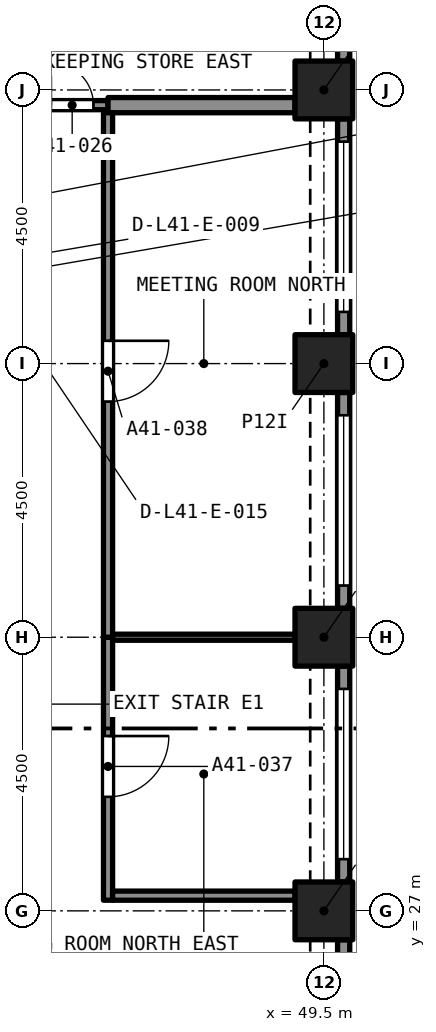
"""IFC4 building model, lengths in metres.
Left out: names, types, materials, properties, quantities, classifications, styles, units other than length and angle.
Written with IfcOpenShell. Run it as: python <this file> out.ifc"""

import sys

from ifc_helpers import new_model, si_unit, direction, frame, frame_2d, origin, origin_2d, place, context, subcontext, project, spatial, rectangle, extrude, element, fill, save


model = new_model("IFC4")
c1 = context("Model", 3, precision=1e-05, world=origin(), true_north=direction((0.0, 1.0)))
c2 = subcontext(c1, "Body", "Model", "MODEL_VIEW")
j1 = project(units=[si_unit("LENGTHUNIT", "METRE"), si_unit("PLANEANGLEUNIT", "RADIAN")], contexts=[c1])
p1 = place(None, origin())
s1 = spatial("IfcSite", under=j1, at=p1, CompositionType="ELEMENT")
p2 = place(p1, origin())
s2 = spatial("IfcBuilding", under=s1, at=p2, CompositionType="ELEMENT")
p3 = place(p2, frame((0.0, 0.0, 146.2)))
s3 = spatial("IfcBuildingStorey", under=s2, at=p3, CompositionType="ELEMENT", Elevation=146.2)
for number, where, z_axis, x_axis in (
    (1, (49.5, 27.0, 0.0), (0.0, 0.0, 1.0), (1.0, 0.0, 0.0)),
    (2, (49.5, 31.5, 0.0), (0.0, 0.0, 1.0), (1.0, 0.0, 0.0)),
    (3, (49.5, 36.0, 0.0), (0.0, 0.0, 1.0), (1.0, 0.0, 0.0)),
    (4, (49.5, 40.5, 0.0), (0.0, 0.0, 1.0), (1.0, 0.0, 0.0)),
):
    element("IfcColumn", number, at=place(p3, frame(where, z_axis=z_axis, x_axis=x_axis)), inside=s3, PredefinedType="COLUMN", context=c2, shape_type="SweptSolid", body=[
        extrude(rectangle(XDim=0.95, YDim=0.95, at=origin_2d()), origin(), (0.0, 0.0, 1.0), 4.4),
    ])
p4 = place(p3, frame((49.825, 26.525, 0.0), z_axis=(0.0, 0.0, 1.0), x_axis=(0.0, -1.0, 0.0)))
e5 = element("IfcWall", 5, at=p4, inside=s3, PredefinedType="SOLIDWALL", context=c2, shape_type="SweptSolid", body=[
    extrude(rectangle(XDim=3.55, YDim=0.2, at=frame_2d((1.775, 0.0))), origin(), (0.0, 0.0, 1.0), 4.4),
])
p5 = place(p4, frame((0.375, 0.0, 0.45)))
e6 = element("IfcOpeningElement", 6, at=p5, cuts=e5, PredefinedType="OPENING", context=c2, shape_type="SweptSolid", body=[
    extrude(rectangle(XDim=2.8, YDim=2.55, at=frame_2d((1.4, 1.275))), frame((0.0, 0.11, 0.0), z_axis=(0.0, -1.0, 0.0), x_axis=(1.0, 0.0, 0.0)), (0.0, 0.0, 1.0), 0.22),
])
p6 = place(p3, frame((49.825, 31.025, 0.0), z_axis=(0.0, 0.0, 1.0), x_axis=(0.0, -1.0, 0.0)))
e7 = element("IfcWall", 7, at=p6, inside=s3, PredefinedType="SOLIDWALL", context=c2, shape_type="SweptSolid", body=[
    extrude(rectangle(XDim=3.55, YDim=0.2, at=frame_2d((1.775, 0.0))), origin(), (0.0, 0.0, 1.0), 4.4),
])
p7 = place(p6, frame((0.375, 0.0, 0.45)))
e8 = element("IfcOpeningElement", 8, at=p7, cuts=e7, PredefinedType="OPENING", context=c2, shape_type="SweptSolid", body=[
    extrude(rectangle(XDim=2.8, YDim=2.55, at=frame_2d((1.4, 1.275))), frame((0.0, 0.11, 0.0), z_axis=(0.0, -1.0, 0.0), x_axis=(1.0, 0.0, 0.0)), (0.0, 0.0, 1.0), 0.22),
])
p8 = place(p3, frame((49.825, 35.525, 0.0), z_axis=(0.0, 0.0, 1.0), x_axis=(0.0, -1.0, 0.0)))
e9 = element("IfcWall", 9, at=p8, inside=s3, PredefinedType="SOLIDWALL", context=c2, shape_type="SweptSolid", body=[
    extrude(rectangle(XDim=3.55, YDim=0.2, at=frame_2d((1.775, 0.0))), origin(), (0.0, 0.0, 1.0), 4.4),
])
p9 = place(p8, frame((0.375, 0.0, 0.45)))
e10 = element("IfcOpeningElement", 10, at=p9, cuts=e9, PredefinedType="OPENING", context=c2, shape_type="SweptSolid", body=[
    extrude(rectangle(XDim=2.8, YDim=2.55, at=frame_2d((1.4, 1.275))), frame((0.0, 0.11, 0.0), z_axis=(0.0, -1.0, 0.0), x_axis=(1.0, 0.0, 0.0)), (0.0, 0.0, 1.0), 0.22),
])
p10 = place(p3, frame((49.825, 40.025, 0.0), z_axis=(0.0, 0.0, 1.0), x_axis=(0.0, -1.0, 0.0)))
e11 = element("IfcWall", 11, at=p10, inside=s3, PredefinedType="SOLIDWALL", context=c2, shape_type="SweptSolid", body=[
    extrude(rectangle(XDim=3.55, YDim=0.2, at=frame_2d((1.775, 0.0))), origin(), (0.0, 0.0, 1.0), 4.4),
])
p11 = place(p10, frame((0.375, 0.0, 0.45)))
e12 = element("IfcOpeningElement", 12, at=p11, cuts=e11, PredefinedType="OPENING", context=c2, shape_type="SweptSolid", body=[
    extrude(rectangle(XDim=2.8, YDim=2.55, at=frame_2d((1.4, 1.275))), frame((0.0, 0.11, 0.0), z_axis=(0.0, -1.0, 0.0), x_axis=(1.0, 0.0, 0.0)), (0.0, 0.0, 1.0), 0.22),
])
p12 = place(p3, frame((49.825, 44.525, 0.0), z_axis=(0.0, 0.0, 1.0), x_axis=(0.0, -1.0, 0.0)))
e13 = element("IfcWall", 13, at=p12, inside=s3, PredefinedType="SOLIDWALL", context=c2, shape_type="SweptSolid", body=[
    extrude(rectangle(XDim=3.55, YDim=0.2, at=frame_2d((1.775, 0.0))), origin(), (0.0, 0.0, 1.0), 4.4),
])
p13 = place(p12, frame((0.375, 0.0, 0.45)))
e14 = element("IfcOpeningElement", 14, at=p13, cuts=e13, PredefinedType="OPENING", context=c2, shape_type="SweptSolid", body=[
    extrude(rectangle(XDim=2.8, YDim=2.55, at=frame_2d((1.4, 1.275))), frame((0.0, 0.11, 0.0), z_axis=(0.0, -1.0, 0.0), x_axis=(1.0, 0.0, 0.0)), (0.0, 0.0, 1.0), 0.22),
])
p14 = place(p3, frame((44.75, 40.25, 0.0), z_axis=(0.0, 0.0, 1.0), x_axis=(1.0, 0.0, 0.0)))
e15 = element("IfcWall", 15, at=p14, inside=s3, PredefinedType="PARTITIONING", context=c2, shape_type="SweptSolid", body=[
    extrude(rectangle(XDim=1.2, YDim=0.15, at=frame_2d((0.6, 0.0))), origin(), (0.0, 0.0, 1.0), 4.1),
])
p15 = place(p14, frame((0.26, 0.0, 0.0)))
e16 = element("IfcOpeningElement", 16, at=p15, cuts=e15, PredefinedType="OPENING", context=c2, shape_type="SweptSolid", body=[
    extrude(rectangle(XDim=0.7, YDim=2.1, at=frame_2d((0.35, 1.05))), frame((0.0, 0.085, 0.0), z_axis=(0.0, -1.0, 0.0), x_axis=(1.0, 0.0, 0.0)), (0.0, 0.0, 1.0), 0.17),
])
p16 = place(p3, frame((45.95, 40.25, 0.0), z_axis=(0.0, 0.0, 1.0), x_axis=(1.0, 0.0, 0.0)))
e17 = element("IfcWall", 17, at=p16, inside=s3, PredefinedType="PARTITIONING", context=c2, shape_type="SweptSolid", body=[
    extrude(rectangle(XDim=3.075, YDim=0.25, at=frame_2d((1.538, 0.0))), origin(), (0.0, 0.0, 1.0), 4.1),
])
p17 = place(p3, frame((45.95, 31.5, 0.0), z_axis=(0.0, 0.0, 1.0), x_axis=(0.0, -1.0, 0.0)))
e18 = element("IfcWall", 18, at=p17, inside=s3, PredefinedType="PARTITIONING", context=c2, shape_type="SweptSolid", body=[
    extrude(rectangle(XDim=4.325, YDim=0.15, at=frame_2d((2.163, 0.0))), origin(), (0.0, 0.0, 1.0), 4.1),
])
p18 = place(p17, frame((1.625, 0.0, 0.0)))
e19 = element("IfcOpeningElement", 19, at=p18, cuts=e18, PredefinedType="OPENING", context=c2, shape_type="SweptSolid", body=[
    extrude(rectangle(XDim=1.0, YDim=2.1, at=frame_2d((0.5, 1.05))), frame((0.0, 0.085, 0.0), z_axis=(0.0, -1.0, 0.0), x_axis=(1.0, 0.0, 0.0)), (0.0, 0.0, 1.0), 0.17),
])
p19 = place(p3, frame((46.025, 27.25, 0.0), z_axis=(0.0, 0.0, 1.0), x_axis=(1.0, 0.0, 0.0)))
e20 = element("IfcWall", 20, at=p19, inside=s3, PredefinedType="PARTITIONING", context=c2, shape_type="SweptSolid", body=[
    extrude(rectangle(XDim=3.0, YDim=0.15, at=frame_2d((1.5, 0.0))), origin(), (0.0, 0.0, 1.0), 4.1),
])
p20 = place(p3, frame((45.95, 40.125, 0.0), z_axis=(0.0, 0.0, 1.0), x_axis=(0.0, -1.0, 0.0)))
e21 = element("IfcWall", 21, at=p20, inside=s3, PredefinedType="PARTITIONING", context=c2, shape_type="SweptSolid", body=[
    extrude(rectangle(XDim=8.625, YDim=0.15, at=frame_2d((4.312, 0.0))), origin(), (0.0, 0.0, 1.0), 4.1),
])
p21 = place(p20, frame((3.75, 0.0, 0.0)))
e22 = element("IfcOpeningElement", 22, at=p21, cuts=e21, PredefinedType="OPENING", context=c2, shape_type="SweptSolid", body=[
    extrude(rectangle(XDim=1.0, YDim=2.1, at=frame_2d((0.5, 1.05))), frame((0.0, 0.085, 0.0), z_axis=(0.0, -1.0, 0.0), x_axis=(1.0, 0.0, 0.0)), (0.0, 0.0, 1.0), 0.17),
])
p22 = place(p3, frame((46.025, 31.5, 0.0), z_axis=(0.0, 0.0, 1.0), x_axis=(1.0, 0.0, 0.0)))
e23 = element("IfcWall", 23, at=p22, inside=s3, PredefinedType="PARTITIONING", context=c2, shape_type="SweptSolid", body=[
    extrude(rectangle(XDim=3.0, YDim=0.1, at=frame_2d((1.5, 0.0))), origin(), (0.0, 0.0, 1.0), 4.1),
])
p23 = place(p7, origin())
e24 = element("IfcWindow", 24, at=p23, inside=s3, PartitioningType="SINGLE_PANEL", PredefinedType="WINDOW", context=c2, shape_type="SweptSolid", body=[
    extrude(rectangle(XDim=2.8, YDim=2.55, at=frame_2d((1.4, 1.275))), frame((0.0, 0.03, 0.0), z_axis=(0.0, -1.0, 0.0), x_axis=(1.0, 0.0, 0.0)), (0.0, 0.0, 1.0), 0.06),
])
fill(e8, e24)
p24 = place(p9, origin())
e25 = element("IfcWindow", 25, at=p24, inside=s3, PartitioningType="SINGLE_PANEL", PredefinedType="WINDOW", context=c2, shape_type="SweptSolid", body=[
    extrude(rectangle(XDim=2.8, YDim=2.55, at=frame_2d((1.4, 1.275))), frame((0.0, 0.03, 0.0), z_axis=(0.0, -1.0, 0.0), x_axis=(1.0, 0.0, 0.0)), (0.0, 0.0, 1.0), 0.06),
])
fill(e10, e25)
p25 = place(p11, origin())
e26 = element("IfcWindow", 26, at=p25, inside=s3, PartitioningType="SINGLE_PANEL", PredefinedType="WINDOW", context=c2, shape_type="SweptSolid", body=[
    extrude(rectangle(XDim=2.8, YDim=2.55, at=frame_2d((1.4, 1.275))), frame((0.0, 0.03, 0.0), z_axis=(0.0, -1.0, 0.0), x_axis=(1.0, 0.0, 0.0)), (0.0, 0.0, 1.0), 0.06),
])
fill(e12, e26)
p26 = place(p15, origin())
e27 = element("IfcDoor", 27, at=p26, inside=s3, OperationType="SINGLE_SWING_RIGHT", PredefinedType="DOOR", context=c2, shape_type="SweptSolid", body=[
    extrude(rectangle(XDim=0.7, YDim=2.1, at=frame_2d((0.35, 1.05))), frame((0.0, 0.025, 0.0), z_axis=(0.0, -1.0, 0.0), x_axis=(1.0, 0.0, 0.0)), (0.0, 0.0, 1.0), 0.05),
])
fill(e16, e27)
p27 = place(p18, origin())
e28 = element("IfcDoor", 28, at=p27, inside=s3, OperationType="SINGLE_SWING_LEFT", PredefinedType="DOOR", context=c2, shape_type="SweptSolid", body=[
    extrude(rectangle(XDim=1.0, YDim=2.1, at=frame_2d((0.5, 1.05))), frame((0.0, 0.025, 0.0), z_axis=(0.0, -1.0, 0.0), x_axis=(1.0, 0.0, 0.0)), (0.0, 0.0, 1.0), 0.05),
])
fill(e19, e28)
p28 = place(p21, origin())
e29 = element("IfcDoor", 29, at=p28, inside=s3, OperationType="SINGLE_SWING_LEFT", PredefinedType="DOOR", context=c2, shape_type="SweptSolid", body=[
    extrude(rectangle(XDim=1.0, YDim=2.1, at=frame_2d((0.5, 1.05))), frame((0.0, 0.025, 0.0), z_axis=(0.0, -1.0, 0.0), x_axis=(1.0, 0.0, 0.0)), (0.0, 0.0, 1.0), 0.05),
])
fill(e22, e29)
save(model, sys.argv[1])
